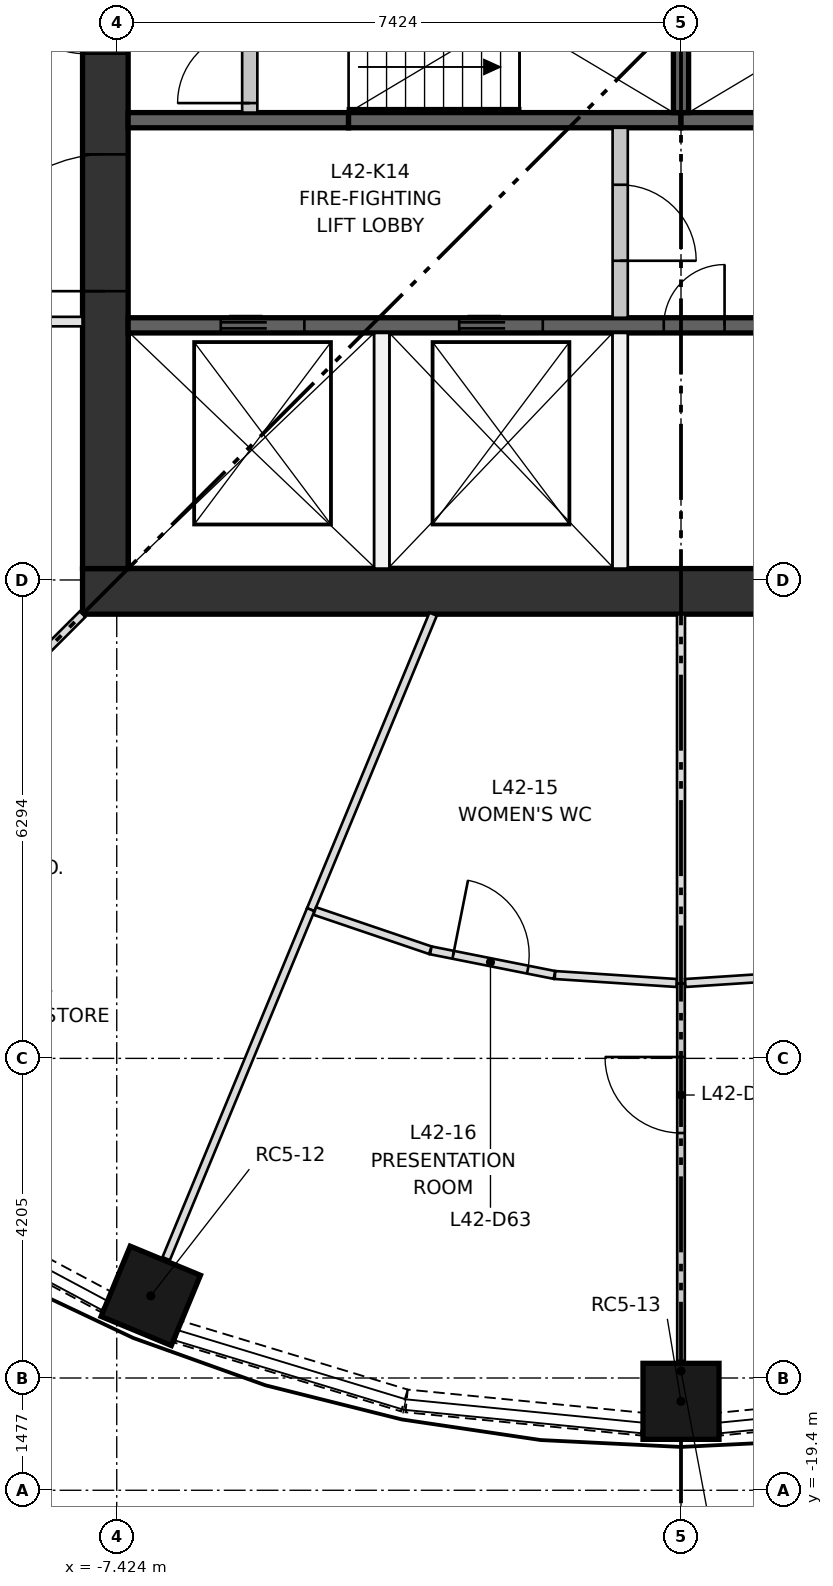
"""IFC4 building model, lengths in metres.
Left out: names, types, materials, properties, quantities, classifications, styles, units other than length and angle.
Written with IfcOpenShell. Run it as: python <this file> out.ifc"""

import sys

from ifc_helpers import new_model, si_unit, direction, frame, frame_2d, origin, origin_2d, place, context, subcontext, project, spatial, rectangle, extrude, element, fill, save


model = new_model("IFC4")
c1 = context("Model", 3, precision=1e-05, world=origin(), true_north=direction((0.0, 1.0)))
c2 = subcontext(c1, "Body", "Model", "MODEL_VIEW")
j1 = project(units=[si_unit("LENGTHUNIT", "METRE"), si_unit("PLANEANGLEUNIT", "RADIAN")], contexts=[c1])
p1 = place(None, origin())
s1 = spatial("IfcSite", under=j1, at=p1, CompositionType="ELEMENT")
p2 = place(p1, origin())
s2 = spatial("IfcBuilding", under=s1, at=p2, CompositionType="ELEMENT")
p3 = place(p2, frame((0.0, 0.0, 157.8)))
s3 = spatial("IfcBuildingStorey", under=s2, at=p3, CompositionType="ELEMENT", Elevation=157.8)
for number, where, z_axis, x_axis in (
    (1, (-6.976, -16.842, 0.0), (0.0, 0.0, 1.0), (-0.383, -0.924, 0.0)),
    (2, (0.0, -18.23, 0.0), (0.0, 0.0, 1.0), (0.0, -1.0, 0.0)),
):
    element("IfcColumn", number, at=place(p3, frame(where, z_axis=z_axis, x_axis=x_axis)), inside=s3, PredefinedType="COLUMN", context=c2, shape_type="SweptSolid", body=[
        extrude(rectangle(XDim=1.0, YDim=1.0, at=origin_2d()), origin(), (0.0, 0.0, 1.0), 3.35),
    ])
p4 = place(p3, frame((-7.874, -7.574, 0.0), z_axis=(0.0, 0.0, 1.0), x_axis=(1.0, 0.0, 0.0)))
e3 = element("IfcWall", 3, at=p4, inside=s3, PredefinedType="SHEAR", context=c2, shape_type="SweptSolid", body=[
    extrude(rectangle(XDim=15.748, YDim=0.6, at=frame_2d((7.874, 0.0))), origin(), (0.0, 0.0, 1.0), 3.35),
])
p5 = place(p3, frame((-7.574, -7.274, 0.0), z_axis=(0.0, 0.0, 1.0), x_axis=(0.0, 1.0, 0.0)))
e4 = element("IfcWall", 4, at=p5, inside=s3, PredefinedType="SHEAR", context=c2, shape_type="SweptSolid", body=[
    extrude(rectangle(XDim=14.548, YDim=0.6, at=frame_2d((7.274, 0.0))), origin(), (0.0, 0.0, 1.0), 3.35),
])
p6 = place(p5, frame((6.774, 0.0, 0.0)))
e5 = element("IfcOpeningElement", 5, at=p6, cuts=e4, PredefinedType="OPENING", context=c2, shape_type="SweptSolid", body=[
    extrude(rectangle(XDim=1.0, YDim=2.1, at=frame_2d((0.5, 1.05))), frame((0.0, 0.31, 0.0), z_axis=(0.0, -1.0, 0.0), x_axis=(1.0, 0.0, 0.0)), (0.0, 0.0, 1.0), 0.62),
])
p7 = place(p5, frame((3.649, 0.0, 0.0)))
e6 = element("IfcOpeningElement", 6, at=p7, cuts=e4, PredefinedType="OPENING", context=c2, shape_type="SweptSolid", body=[
    extrude(rectangle(XDim=1.8, YDim=2.1, at=frame_2d((0.9, 1.05))), frame((0.0, 0.31, 0.0), z_axis=(0.0, -1.0, 0.0), x_axis=(1.0, 0.0, 0.0)), (0.0, 0.0, 1.0), 0.62),
])
p8 = place(p5, frame((9.098, 0.0, 0.0)))
e7 = element("IfcOpeningElement", 7, at=p8, cuts=e4, PredefinedType="OPENING", context=c2, shape_type="SweptSolid", body=[
    extrude(rectangle(XDim=1.8, YDim=2.1, at=frame_2d((0.9, 1.05))), frame((0.0, 0.31, 0.0), z_axis=(0.0, -1.0, 0.0), x_axis=(1.0, 0.0, 0.0)), (0.0, 0.0, 1.0), 0.62),
])
p9 = place(p3, frame((-7.274, -4.074, 0.0), z_axis=(0.0, 0.0, 1.0), x_axis=(1.0, 0.0, 0.0)))
e8 = element("IfcWall", 8, at=p9, inside=s3, PredefinedType="SHEAR", context=c2, shape_type="SweptSolid", body=[
    extrude(rectangle(XDim=14.548, YDim=0.2, at=frame_2d((7.274, 0.0))), origin(), (0.0, 0.0, 1.0), 3.0),
])
p10 = place(p9, frame((1.219, 0.0, 0.0)))
e9 = element("IfcOpeningElement", 9, at=p10, cuts=e8, PredefinedType="OPENING", context=c2, shape_type="SweptSolid", body=[
    extrude(rectangle(XDim=1.1, YDim=2.1, at=frame_2d((0.55, 1.05))), frame((0.0, 0.11, 0.0), z_axis=(0.0, -1.0, 0.0), x_axis=(1.0, 0.0, 0.0)), (0.0, 0.0, 1.0), 0.22),
])
p11 = place(p9, frame((4.355, 0.0, 0.0)))
e10 = element("IfcOpeningElement", 10, at=p11, cuts=e8, PredefinedType="OPENING", context=c2, shape_type="SweptSolid", body=[
    extrude(rectangle(XDim=1.1, YDim=2.1, at=frame_2d((0.55, 1.05))), frame((0.0, 0.11, 0.0), z_axis=(0.0, -1.0, 0.0), x_axis=(1.0, 0.0, 0.0)), (0.0, 0.0, 1.0), 0.22),
])
p12 = place(p9, frame((7.047, 0.0, 0.0)))
e11 = element("IfcOpeningElement", 11, at=p12, cuts=e8, PredefinedType="OPENING", context=c2, shape_type="SweptSolid", body=[
    extrude(rectangle(XDim=0.8, YDim=2.1, at=frame_2d((0.4, 1.05))), frame((0.0, 0.11, 0.0), z_axis=(0.0, -1.0, 0.0), x_axis=(1.0, 0.0, 0.0)), (0.0, 0.0, 1.0), 0.22),
])
p13 = place(p9, frame((9.185, 0.0, 0.0)))
e12 = element("IfcOpeningElement", 12, at=p13, cuts=e8, PredefinedType="OPENING", context=c2, shape_type="SweptSolid", body=[
    extrude(rectangle(XDim=1.0, YDim=2.1, at=frame_2d((0.5, 1.05))), frame((0.0, 0.11, 0.0), z_axis=(0.0, -1.0, 0.0), x_axis=(1.0, 0.0, 0.0)), (0.0, 0.0, 1.0), 0.22),
])
p14 = place(p9, frame((11.228, 0.0, 0.0)))
e13 = element("IfcOpeningElement", 13, at=p14, cuts=e8, PredefinedType="OPENING", context=c2, shape_type="SweptSolid", body=[
    extrude(rectangle(XDim=1.0, YDim=2.1, at=frame_2d((0.5, 1.05))), frame((0.0, 0.11, 0.0), z_axis=(0.0, -1.0, 0.0), x_axis=(1.0, 0.0, 0.0)), (0.0, 0.0, 1.0), 0.22),
])
p15 = place(p9, frame((13.078, 0.0, 0.0)))
e14 = element("IfcOpeningElement", 14, at=p15, cuts=e8, PredefinedType="OPENING", context=c2, shape_type="SweptSolid", body=[
    extrude(rectangle(XDim=1.0, YDim=2.1, at=frame_2d((0.5, 1.05))), frame((0.0, 0.11, 0.0), z_axis=(0.0, -1.0, 0.0), x_axis=(1.0, 0.0, 0.0)), (0.0, 0.0, 1.0), 0.22),
])
p16 = place(p3, frame((-7.274, -1.375, 0.0), z_axis=(0.0, 0.0, 1.0), x_axis=(1.0, 0.0, 0.0)))
e15 = element("IfcWall", 15, at=p16, inside=s3, PredefinedType="SHEAR", context=c2, shape_type="SweptSolid", body=[
    extrude(rectangle(XDim=2.9, YDim=0.2, at=frame_2d((1.45, 0.0))), origin(), (0.0, 0.0, 1.0), 3.0),
])
for number, where, z_axis, x_axis in (
    (16, (-4.374, -1.375, 0.0), (0.0, 0.0, 1.0), (1.0, 0.0, 0.0)),
    (17, (0.0, -1.375, 0.0), (0.0, 0.0, 1.0), (1.0, 0.0, 0.0)),
):
    element("IfcWall", number, at=place(p3, frame(where, z_axis=z_axis, x_axis=x_axis)), inside=s3, PredefinedType="SHEAR", context=c2, shape_type="SweptSolid", body=[
        extrude(rectangle(XDim=4.374, YDim=0.2, at=frame_2d((2.187, 0.0))), origin(), (0.0, 0.0, 1.0), 3.0),
    ])
p17 = place(p3, frame((0.0, -1.275, 0.0), z_axis=(0.0, 0.0, 1.0), x_axis=(0.0, 1.0, 0.0)))
e18 = element("IfcWall", 18, at=p17, inside=s3, PredefinedType="SHEAR", context=c2, shape_type="SweptSolid", body=[
    extrude(rectangle(XDim=2.55, YDim=0.2, at=frame_2d((1.275, 0.0))), origin(), (0.0, 0.0, 1.0), 3.0),
])
for number, where, z_axis, x_axis in (
    (19, (-3.937, -7.274, 0.0), (0.0, 0.0, 1.0), (0.0, 1.0, 0.0)),
    (20, (-0.8, -7.274, 0.0), (0.0, 0.0, 1.0), (0.0, 1.0, 0.0)),
):
    element("IfcWall", number, at=place(p3, frame(where, z_axis=z_axis, x_axis=x_axis)), inside=s3, PredefinedType="PARTITIONING", context=c2, shape_type="SweptSolid", body=[
        extrude(rectangle(XDim=3.1, YDim=0.2, at=frame_2d((1.55, 0.0))), origin(), (0.0, 0.0, 1.0), 3.0),
    ])
p18 = place(p3, frame((-0.8, -3.974, 0.0), z_axis=(0.0, 0.0, 1.0), x_axis=(0.0, 1.0, 0.0)))
e21 = element("IfcWall", 21, at=p18, inside=s3, PredefinedType="PARTITIONING", context=c2, shape_type="SweptSolid", body=[
    extrude(rectangle(XDim=2.499, YDim=0.2, at=frame_2d((1.25, 0.0))), origin(), (0.0, 0.0, 1.0), 3.0),
])
p19 = place(p18, frame((0.75, 0.0, 0.0)))
e22 = element("IfcOpeningElement", 22, at=p19, cuts=e21, PredefinedType="OPENING", context=c2, shape_type="SweptSolid", body=[
    extrude(rectangle(XDim=1.0, YDim=2.1, at=frame_2d((0.5, 1.05))), frame((0.0, 0.11, 0.0), z_axis=(0.0, -1.0, 0.0), x_axis=(1.0, 0.0, 0.0)), (0.0, 0.0, 1.0), 0.22),
])
p20 = place(p3, frame((-5.674, -1.275, 0.0), z_axis=(0.0, 0.0, 1.0), x_axis=(0.0, 1.0, 0.0)))
e23 = element("IfcWall", 23, at=p20, inside=s3, PredefinedType="PARTITIONING", context=c2, shape_type="SweptSolid", body=[
    extrude(rectangle(XDim=2.55, YDim=0.2, at=frame_2d((1.275, 0.0))), origin(), (0.0, 0.0, 1.0), 3.0),
])
p21 = place(p20, frame((0.125, 0.0, 0.0)))
e24 = element("IfcOpeningElement", 24, at=p21, cuts=e23, PredefinedType="OPENING", context=c2, shape_type="SweptSolid", body=[
    extrude(rectangle(XDim=0.95, YDim=2.1, at=frame_2d((0.475, 1.05))), frame((0.0, 0.11, 0.0), z_axis=(0.0, -1.0, 0.0), x_axis=(1.0, 0.0, 0.0)), (0.0, 0.0, 1.0), 0.22),
])
p22 = place(p20, frame((1.475, 0.0, 0.0)))
e25 = element("IfcOpeningElement", 25, at=p22, cuts=e23, PredefinedType="OPENING", context=c2, shape_type="SweptSolid", body=[
    extrude(rectangle(XDim=0.95, YDim=2.1, at=frame_2d((0.475, 1.05))), frame((0.0, 0.11, 0.0), z_axis=(0.0, -1.0, 0.0), x_axis=(1.0, 0.0, 0.0)), (0.0, 0.0, 1.0), 0.22),
])
p23 = place(p3, frame((-10.309, -15.455, 0.0), z_axis=(0.0, 0.0, 1.0), x_axis=(0.881883291798, -0.471467771589, 0.0)))
e26 = element("IfcWall", 26, at=p23, inside=s3, PredefinedType="SOLIDWALL", context=c2, shape_type="SweptSolid", body=[
    extrude(rectangle(XDim=3.111, YDim=0.3, at=frame_2d((1.556, 0.0))), origin(), (0.0, 0.0, 1.0), 0.9),
])
p24 = place(p3, frame((-6.617, -17.315, 0.0), z_axis=(0.0, 0.0, 1.0), x_axis=(0.956947154002, -0.29026219948, 0.0)))
e27 = element("IfcWall", 27, at=p24, inside=s3, PredefinedType="SOLIDWALL", context=c2, shape_type="SweptSolid", body=[
    extrude(rectangle(XDim=3.111, YDim=0.3, at=frame_2d((1.556, 0.0))), origin(), (0.0, 0.0, 1.0), 0.9),
])
for number, where, z_axis, x_axis in (
    (28, (-3.61, -18.225, 0.0), (0.0, 0.0, 1.0), (0.995, -0.098, 0.0)),
    (29, (0.514, -18.53, 0.0), (0.0, 0.0, 1.0), (0.995, 0.098, 0.0)),
):
    element("IfcWall", number, at=place(p3, frame(where, z_axis=z_axis, x_axis=x_axis)), inside=s3, PredefinedType="SOLIDWALL", context=c2, shape_type="SweptSolid", body=[
        extrude(rectangle(XDim=3.111, YDim=0.3, at=frame_2d((1.556, 0.0))), origin(), (0.0, 0.0, 1.0), 0.9),
    ])
p25 = place(p3, frame((-7.874, -4.024, 0.0), z_axis=(0.0, 0.0, 1.0), x_axis=(-1.0, 0.0, 0.0)))
e30 = element("IfcWall", 30, at=p25, inside=s3, PredefinedType="PARTITIONING", context=c2, shape_type="SweptSolid", body=[
    extrude(rectangle(XDim=3.771, YDim=0.125, at=frame_2d((1.886, 0.0))), origin(), (0.0, 0.0, 1.0), 3.0),
])
p26 = place(p25, frame((1.2, 0.0, 0.0)))
e31 = element("IfcOpeningElement", 31, at=p26, cuts=e30, PredefinedType="OPENING", context=c2, shape_type="SweptSolid", body=[
    extrude(rectangle(XDim=1.0, YDim=2.1, at=frame_2d((0.5, 1.05))), frame((0.0, 0.073, 0.0), z_axis=(0.0, -1.0, 0.0), x_axis=(1.0, 0.0, 0.0)), (0.0, 0.0, 1.0), 0.145),
])
p27 = place(p3, frame((-7.874, -7.874, 0.0), z_axis=(0.0, 0.0, 1.0), x_axis=(-0.707106781187, -0.707106781187, 0.0)))
e32 = element("IfcWall", 32, at=p27, inside=s3, PredefinedType="PARTITIONING", context=c2, shape_type="SweptSolid", body=[
    extrude(rectangle(XDim=6.564, YDim=0.105, at=frame_2d((3.282, 0.0))), origin(), (0.0, 0.0, 1.0), 3.0),
])
p28 = place(p27, frame((2.5, 0.0, 0.0)))
e33 = element("IfcOpeningElement", 33, at=p28, cuts=e32, PredefinedType="OPENING", context=c2, shape_type="SweptSolid", body=[
    extrude(rectangle(XDim=1.0, YDim=2.1, at=frame_2d((0.5, 1.05))), frame((0.0, 0.062, 0.0), z_axis=(0.0, -1.0, 0.0), x_axis=(1.0, 0.0, 0.0)), (0.0, 0.0, 1.0), 0.125),
])
p29 = place(p3, frame((-3.261, -7.874, 0.0), z_axis=(0.0, 0.0, 1.0), x_axis=(-0.38269858238, -0.923873257024, 0.0)))
e34 = element("IfcWall", 34, at=p29, inside=s3, PredefinedType="PARTITIONING", context=c2, shape_type="SweptSolid", body=[
    extrude(rectangle(XDim=4.207, YDim=0.105, at=frame_2d((2.104, 0.0))), origin(), (0.0, 0.0, 1.0), 3.0),
])
p30 = place(p3, frame((-4.872, -11.761, 0.0), z_axis=(0.0, 0.0, 1.0), x_axis=(-0.38266126553, -0.923888714003, 0.0)))
e35 = element("IfcWall", 35, at=p30, inside=s3, PredefinedType="PARTITIONING", context=c2, shape_type="SweptSolid", body=[
    extrude(rectangle(XDim=4.97, YDim=0.105, at=frame_2d((2.485, 0.0))), origin(), (0.0, 0.0, 1.0), 3.0),
])
p31 = place(p3, frame((-3.298, -12.295, 0.0), z_axis=(0.0, 0.0, 1.0), x_axis=(-0.946935734923, 0.321422951771, 0.0)))
e36 = element("IfcWall", 36, at=p31, inside=s3, PredefinedType="PARTITIONING", context=c2, shape_type="SweptSolid", body=[
    extrude(rectangle(XDim=1.606, YDim=0.105, at=frame_2d((0.803, 0.0))), origin(), (0.0, 0.0, 1.0), 3.0),
])
p32 = place(p3, frame((-3.292, -12.297, 0.0), z_axis=(0.0, 0.0, 1.0), x_axis=(0.980789623675, -0.195068485645, 0.0)))
e37 = element("IfcWall", 37, at=p32, inside=s3, PredefinedType="PARTITIONING", context=c2, shape_type="SweptSolid", body=[
    extrude(rectangle(XDim=1.658, YDim=0.105, at=frame_2d((0.829, 0.0))), origin(), (0.0, 0.0, 1.0), 3.0),
])
p33 = place(p32, frame((0.3, 0.0, 0.0)))
e38 = element("IfcOpeningElement", 38, at=p33, cuts=e37, PredefinedType="OPENING", context=c2, shape_type="SweptSolid", body=[
    extrude(rectangle(XDim=1.0, YDim=2.1, at=frame_2d((0.5, 1.05))), frame((0.0, 0.062, 0.0), z_axis=(0.0, -1.0, 0.0), x_axis=(1.0, 0.0, 0.0)), (0.0, 0.0, 1.0), 0.125),
])
p34 = place(p3, frame((-0.056, -12.726, 0.0), z_axis=(0.0, 0.0, 1.0), x_axis=(-0.997860527919, 0.065378641933, 0.0)))
e39 = element("IfcWall", 39, at=p34, inside=s3, PredefinedType="PARTITIONING", context=c2, shape_type="SweptSolid", body=[
    extrude(rectangle(XDim=1.606, YDim=0.105, at=frame_2d((0.803, 0.0))), origin(), (0.0, 0.0, 1.0), 3.0),
])
p35 = place(p3, frame((0.0, -7.874, 0.0), z_axis=(0.0, 0.0, 1.0), x_axis=(0.0, -1.0, 0.0)))
e40 = element("IfcWall", 40, at=p35, inside=s3, PredefinedType="PARTITIONING", context=c2, shape_type="SweptSolid", body=[
    extrude(rectangle(XDim=4.856, YDim=0.105, at=frame_2d((2.428, 0.0))), origin(), (0.0, 0.0, 1.0), 3.0),
])
p36 = place(p3, frame((0.0, -17.7, 0.0), z_axis=(0.0, 0.0, 1.0), x_axis=(0.0, 1.0, 0.0)))
e41 = element("IfcWall", 41, at=p36, inside=s3, PredefinedType="PARTITIONING", context=c2, shape_type="SweptSolid", body=[
    extrude(rectangle(XDim=4.97, YDim=0.1, at=frame_2d((2.485, 0.0))), origin(), (0.0, 0.0, 1.0), 3.0),
])
p37 = place(p36, frame((3.0, 0.0, 0.0)))
e42 = element("IfcOpeningElement", 42, at=p37, cuts=e41, PredefinedType="OPENING", context=c2, shape_type="SweptSolid", body=[
    extrude(rectangle(XDim=1.0, YDim=2.1, at=frame_2d((0.5, 1.05))), frame((0.0, 0.06, 0.0), z_axis=(0.0, -1.0, 0.0), x_axis=(1.0, 0.0, 0.0)), (0.0, 0.0, 1.0), 0.12),
])
p38 = place(p3, frame((1.658, -12.621, 0.0), z_axis=(0.0, 0.0, 1.0), x_axis=(-0.997860527919, -0.065378641933, 0.0)))
e43 = element("IfcWall", 43, at=p38, inside=s3, PredefinedType="PARTITIONING", context=c2, shape_type="SweptSolid", body=[
    extrude(rectangle(XDim=1.606, YDim=0.105, at=frame_2d((0.803, 0.0))), origin(), (0.0, 0.0, 1.0), 3.0),
])
p39 = place(p10, origin())
e44 = element("IfcDoor", 44, at=p39, inside=s3, OperationType="DOUBLE_DOOR_SLIDING", PredefinedType="DOOR", context=c2, shape_type="SweptSolid", body=[
    extrude(rectangle(XDim=1.1, YDim=2.1, at=frame_2d((0.55, 1.05))), frame((0.0, 0.025, 0.0), z_axis=(0.0, -1.0, 0.0), x_axis=(1.0, 0.0, 0.0)), (0.0, 0.0, 1.0), 0.05),
])
fill(e9, e44)
p40 = place(p11, origin())
e45 = element("IfcDoor", 45, at=p40, inside=s3, OperationType="DOUBLE_DOOR_SLIDING", PredefinedType="DOOR", context=c2, shape_type="SweptSolid", body=[
    extrude(rectangle(XDim=1.1, YDim=2.1, at=frame_2d((0.55, 1.05))), frame((0.0, 0.025, 0.0), z_axis=(0.0, -1.0, 0.0), x_axis=(1.0, 0.0, 0.0)), (0.0, 0.0, 1.0), 0.05),
])
fill(e10, e45)
p41 = place(p21, origin())
e46 = element("IfcDoor", 46, at=p41, inside=s3, OperationType="SINGLE_SWING_LEFT", PredefinedType="DOOR", context=c2, shape_type="SweptSolid", body=[
    extrude(rectangle(XDim=0.95, YDim=2.1, at=frame_2d((0.475, 1.05))), frame((0.0, 0.025, 0.0), z_axis=(0.0, -1.0, 0.0), x_axis=(1.0, 0.0, 0.0)), (0.0, 0.0, 1.0), 0.05),
])
fill(e24, e46)
p42 = place(p19, frame((1.0, 0.0, 0.0), z_axis=(0.0, 0.0, 1.0), x_axis=(-1.0, 0.0, 0.0)))
e47 = element("IfcDoor", 47, at=p42, inside=s3, OperationType="SINGLE_SWING_LEFT", PredefinedType="DOOR", context=c2, shape_type="SweptSolid", body=[
    extrude(rectangle(XDim=1.0, YDim=2.1, at=frame_2d((0.5, 1.05))), frame((0.0, 0.025, 0.0), z_axis=(0.0, -1.0, 0.0), x_axis=(1.0, 0.0, 0.0)), (0.0, 0.0, 1.0), 0.05),
])
fill(e22, e47)
p43 = place(p12, origin())
e48 = element("IfcDoor", 48, at=p43, inside=s3, OperationType="SINGLE_SWING_RIGHT", PredefinedType="DOOR", context=c2, shape_type="SweptSolid", body=[
    extrude(rectangle(XDim=0.8, YDim=2.1, at=frame_2d((0.4, 1.05))), frame((0.0, 0.025, 0.0), z_axis=(0.0, -1.0, 0.0), x_axis=(1.0, 0.0, 0.0)), (0.0, 0.0, 1.0), 0.05),
])
fill(e11, e48)
p44 = place(p6, origin())
e49 = element("IfcDoor", 49, at=p44, inside=s3, OperationType="SINGLE_SWING_RIGHT", PredefinedType="DOOR", context=c2, shape_type="SweptSolid", body=[
    extrude(rectangle(XDim=1.0, YDim=2.1, at=frame_2d((0.5, 1.05))), frame((0.0, 0.3, 0.0), z_axis=(0.0, -1.0, 0.0), x_axis=(1.0, 0.0, 0.0)), (0.0, 0.0, 1.0), 0.05),
])
fill(e5, e49)
p45 = place(p7, origin())
e50 = element("IfcDoor", 50, at=p45, inside=s3, OperationType="DOUBLE_DOOR_SINGLE_SWING", PredefinedType="DOOR", context=c2, shape_type="SweptSolid", body=[
    extrude(rectangle(XDim=1.8, YDim=2.1, at=frame_2d((0.9, 1.05))), frame((0.0, 0.025, 0.0), z_axis=(0.0, -1.0, 0.0), x_axis=(1.0, 0.0, 0.0)), (0.0, 0.0, 1.0), 0.05),
])
fill(e6, e50)
p46 = place(p33, origin())
e51 = element("IfcDoor", 51, at=p46, inside=s3, OperationType="SINGLE_SWING_LEFT", PredefinedType="DOOR", context=c2, shape_type="SweptSolid", body=[
    extrude(rectangle(XDim=1.0, YDim=2.1, at=frame_2d((0.5, 1.05))), frame((0.0, 0.025, 0.0), z_axis=(0.0, -1.0, 0.0), x_axis=(1.0, 0.0, 0.0)), (0.0, 0.0, 1.0), 0.05),
])
fill(e38, e51)
p47 = place(p37, origin())
e52 = element("IfcDoor", 52, at=p47, inside=s3, OperationType="SINGLE_SWING_RIGHT", PredefinedType="DOOR", context=c2, shape_type="SweptSolid", body=[
    extrude(rectangle(XDim=1.0, YDim=2.1, at=frame_2d((0.5, 1.05))), frame((0.0, 0.025, 0.0), z_axis=(0.0, -1.0, 0.0), x_axis=(1.0, 0.0, 0.0)), (0.0, 0.0, 1.0), 0.05),
])
fill(e42, e52)
save(model, sys.argv[1])
